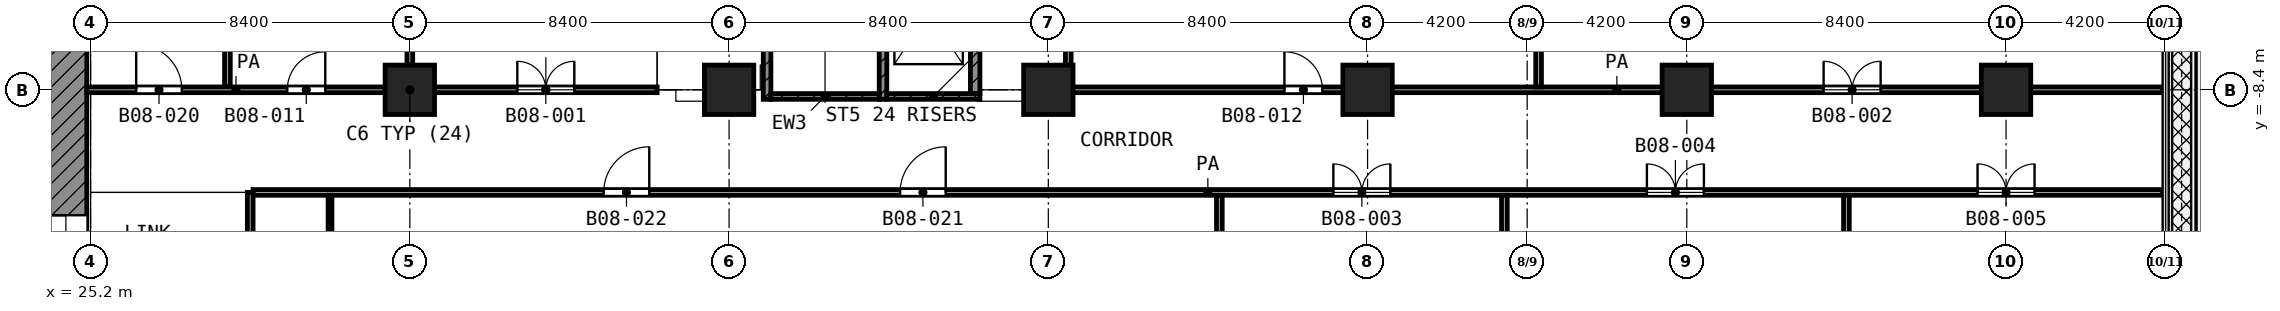
"""IFC4 building model, lengths in metres.
Left out: names, types, materials, properties, quantities, classifications, styles, units other than length and angle.
Written with IfcOpenShell. Run it as: python <this file> out.ifc"""

import sys

from ifc_helpers import new_model, si_unit, direction, frame, frame_2d, origin, origin_2d, place, context, subcontext, project, spatial, rectangle, extrude, element, fill, save


model = new_model("IFC4")
c1 = context("Model", 3, precision=1e-05, world=origin(), true_north=direction((0.0, 1.0)))
c2 = subcontext(c1, "Body", "Model", "MODEL_VIEW")
j1 = project(units=[si_unit("LENGTHUNIT", "METRE"), si_unit("PLANEANGLEUNIT", "RADIAN")], contexts=[c1])
p1 = place(None, origin())
s1 = spatial("IfcSite", under=j1, at=p1, CompositionType="ELEMENT")
p2 = place(p1, origin())
s2 = spatial("IfcBuilding", under=s1, at=p2, CompositionType="ELEMENT")
p3 = place(p2, frame((0.0, 0.0, 39.2)))
s3 = spatial("IfcBuildingStorey", under=s2, at=p3, CompositionType="ELEMENT", Elevation=39.2)
for number, where, z_axis, x_axis in (
    (1, (33.6, -8.4, 0.0), (0.0, 0.0, 1.0), (1.0, 0.0, 0.0)),
    (2, (42.0, -8.4, 0.0), (0.0, 0.0, 1.0), (1.0, 0.0, 0.0)),
    (3, (50.4, -8.4, 0.0), (0.0, 0.0, 1.0), (1.0, 0.0, 0.0)),
    (4, (58.8, -8.4, 0.0), (0.0, 0.0, 1.0), (1.0, 0.0, 0.0)),
    (5, (67.2, -8.4, 0.0), (0.0, 0.0, 1.0), (1.0, 0.0, 0.0)),
    (6, (75.6, -8.4, 0.0), (0.0, 0.0, 1.0), (1.0, 0.0, 0.0)),
):
    element("IfcColumn", number, at=place(p3, frame(where, z_axis=z_axis, x_axis=x_axis)), inside=s3, PredefinedType="COLUMN", context=c2, shape_type="SweptSolid", body=[
        extrude(rectangle(XDim=1.3, YDim=1.3, at=origin_2d()), origin(), (0.0, 0.0, 1.0), 4.2),
    ])
p4 = place(p3, frame((24.55, -24.0, 0.0), z_axis=(0.0, 0.0, 1.0), x_axis=(0.0, 1.0, 0.0)))
e7 = element("IfcWall", 7, at=p4, inside=s3, PredefinedType="SHEAR", context=c2, shape_type="SweptSolid", body=[
    extrude(rectangle(XDim=18.6, YDim=1.1, at=frame_2d((9.3, 0.0))), origin(), (0.0, 0.0, 1.0), 3.9),
])
p5 = place(p4, frame((10.5, 0.0, 0.0)))
e8 = element("IfcOpeningElement", 8, at=p5, cuts=e7, PredefinedType="OPENING", context=c2, shape_type="SweptSolid", body=[
    extrude(rectangle(XDim=1.8, YDim=2.1, at=frame_2d((0.9, 1.05))), frame((0.0, 0.56, 0.0), z_axis=(0.0, -1.0, 0.0), x_axis=(1.0, 0.0, 0.0)), (0.0, 0.0, 1.0), 1.12),
])
p6 = place(p3, frame((43.0, -8.65, 0.0), z_axis=(0.0, 0.0, 1.0), x_axis=(0.0, 1.0, 0.0)))
e9 = element("IfcWall", 9, at=p6, inside=s3, PredefinedType="SHEAR", context=c2, shape_type="SweptSolid", body=[
    extrude(rectangle(XDim=8.35, YDim=0.2, at=frame_2d((4.175, 0.0))), origin(), (0.0, 0.0, 1.0), 3.9),
])
p7 = place(p6, frame((7.0, 0.0, 0.0)))
e10 = element("IfcOpeningElement", 10, at=p7, cuts=e9, PredefinedType="OPENING", context=c2, shape_type="SweptSolid", body=[
    extrude(rectangle(XDim=1.1, YDim=2.1, at=frame_2d((0.55, 1.05))), frame((0.0, 0.11, 0.0), z_axis=(0.0, -1.0, 0.0), x_axis=(1.0, 0.0, 0.0)), (0.0, 0.0, 1.0), 0.22),
])
p8 = place(p3, frame((46.05, -8.65, 0.0), z_axis=(0.0, 0.0, 1.0), x_axis=(0.0, 1.0, 0.0)))
e11 = element("IfcWall", 11, at=p8, inside=s3, PredefinedType="SHEAR", context=c2, shape_type="SweptSolid", body=[
    extrude(rectangle(XDim=8.35, YDim=0.2, at=frame_2d((4.175, 0.0))), origin(), (0.0, 0.0, 1.0), 3.9),
])
p9 = place(p8, frame((7.0, 0.0, 0.0)))
e12 = element("IfcOpeningElement", 12, at=p9, cuts=e11, PredefinedType="OPENING", context=c2, shape_type="SweptSolid", body=[
    extrude(rectangle(XDim=1.1, YDim=2.1, at=frame_2d((0.55, 1.05))), frame((0.0, 0.11, 0.0), z_axis=(0.0, -1.0, 0.0), x_axis=(1.0, 0.0, 0.0)), (0.0, 0.0, 1.0), 0.22),
])
p10 = place(p3, frame((43.1, -8.575, 0.0), z_axis=(0.0, 0.0, 1.0), x_axis=(1.0, 0.0, 0.0)))
e13 = element("IfcWall", 13, at=p10, inside=s3, PredefinedType="SHEAR", context=c2, shape_type="SweptSolid", body=[
    extrude(rectangle(XDim=2.85, YDim=0.15, at=frame_2d((1.425, 0.0))), origin(), (0.0, 0.0, 1.0), 3.9),
])
p11 = place(p3, frame((46.15, -8.575, 0.0), z_axis=(0.0, 0.0, 1.0), x_axis=(1.0, 0.0, 0.0)))
e14 = element("IfcWall", 14, at=p11, inside=s3, PredefinedType="SHEAR", context=c2, shape_type="SweptSolid", body=[
    extrude(rectangle(XDim=2.45, YDim=0.15, at=frame_2d((1.225, 0.0))), origin(), (0.0, 0.0, 1.0), 3.9),
])
p12 = place(p3, frame((48.475, -8.5, 0.0), z_axis=(0.0, 0.0, 1.0), x_axis=(0.0, 1.0, 0.0)))
e15 = element("IfcWall", 15, at=p12, inside=s3, PredefinedType="SHEAR", context=c2, shape_type="SweptSolid", body=[
    extrude(rectangle(XDim=3.475, YDim=0.25, at=frame_2d((1.738, 0.0))), origin(), (0.0, 0.0, 1.0), 3.9),
])
p13 = place(p3, frame((31.5, -13.8, 0.0), z_axis=(0.0, 0.0, 1.0), x_axis=(0.0, 1.0, 0.0)))
e16 = element("IfcWall", 16, at=p13, inside=s3, PredefinedType="PARTITIONING", context=c2, shape_type="SweptSolid", body=[
    extrude(rectangle(XDim=2.625, YDim=0.1, at=frame_2d((1.312, 0.0))), origin(), (0.0, 0.0, 1.0), 3.9),
])
p14 = place(p3, frame((29.475, -11.1, 0.0), z_axis=(0.0, 0.0, 1.0), x_axis=(1.0, 0.0, 0.0)))
e17 = element("IfcWall", 17, at=p14, inside=s3, PredefinedType="PARTITIONING", context=c2, shape_type="SweptSolid", body=[
    extrude(rectangle(XDim=50.245, YDim=0.15, at=frame_2d((25.123, 0.0))), origin(), (0.0, 0.0, 1.0), 3.9),
])
p15 = place(p14, frame((17.025, 0.0, 0.0)))
e18 = element("IfcOpeningElement", 18, at=p15, cuts=e17, PredefinedType="OPENING", context=c2, shape_type="SweptSolid", body=[
    extrude(rectangle(XDim=1.2, YDim=2.1, at=frame_2d((0.6, 1.05))), frame((0.0, 0.085, 0.0), z_axis=(0.0, -1.0, 0.0), x_axis=(1.0, 0.0, 0.0)), (0.0, 0.0, 1.0), 0.17),
])
p16 = place(p14, frame((9.225, 0.0, 0.0)))
e19 = element("IfcOpeningElement", 19, at=p16, cuts=e17, PredefinedType="OPENING", context=c2, shape_type="SweptSolid", body=[
    extrude(rectangle(XDim=1.2, YDim=2.1, at=frame_2d((0.6, 1.05))), frame((0.0, 0.085, 0.0), z_axis=(0.0, -1.0, 0.0), x_axis=(1.0, 0.0, 0.0)), (0.0, 0.0, 1.0), 0.17),
])
p17 = place(p14, frame((28.425, 0.0, 0.0)))
e20 = element("IfcOpeningElement", 20, at=p17, cuts=e17, PredefinedType="OPENING", context=c2, shape_type="SweptSolid", body=[
    extrude(rectangle(XDim=1.5, YDim=2.1, at=frame_2d((0.75, 1.05))), frame((0.0, 0.085, 0.0), z_axis=(0.0, -1.0, 0.0), x_axis=(1.0, 0.0, 0.0)), (0.0, 0.0, 1.0), 0.17),
])
p18 = place(p14, frame((36.675, 0.0, 0.0)))
e21 = element("IfcOpeningElement", 21, at=p18, cuts=e17, PredefinedType="OPENING", context=c2, shape_type="SweptSolid", body=[
    extrude(rectangle(XDim=1.5, YDim=2.1, at=frame_2d((0.75, 1.05))), frame((0.0, 0.085, 0.0), z_axis=(0.0, -1.0, 0.0), x_axis=(1.0, 0.0, 0.0)), (0.0, 0.0, 1.0), 0.17),
])
p19 = place(p14, frame((45.375, 0.0, 0.0)))
e22 = element("IfcOpeningElement", 22, at=p19, cuts=e17, PredefinedType="OPENING", context=c2, shape_type="SweptSolid", body=[
    extrude(rectangle(XDim=1.5, YDim=2.1, at=frame_2d((0.75, 1.05))), frame((0.0, 0.085, 0.0), z_axis=(0.0, -1.0, 0.0), x_axis=(1.0, 0.0, 0.0)), (0.0, 0.0, 1.0), 0.17),
])
p20 = place(p3, frame((25.1, -8.4, 0.0), z_axis=(0.0, 0.0, 1.0), x_axis=(1.0, 0.0, 0.0)))
e23 = element("IfcWall", 23, at=p20, inside=s3, PredefinedType="PARTITIONING", context=c2, shape_type="SweptSolid", body=[
    extrude(rectangle(XDim=7.85, YDim=0.15, at=frame_2d((3.925, 0.0))), origin(), (0.0, 0.0, 1.0), 3.9),
])
p21 = place(p20, frame((1.3, 0.0, 0.0)))
e24 = element("IfcOpeningElement", 24, at=p21, cuts=e23, PredefinedType="OPENING", context=c2, shape_type="SweptSolid", body=[
    extrude(rectangle(XDim=1.2, YDim=2.1, at=frame_2d((0.6, 1.05))), frame((0.0, 0.085, 0.0), z_axis=(0.0, -1.0, 0.0), x_axis=(1.0, 0.0, 0.0)), (0.0, 0.0, 1.0), 0.17),
])
p22 = place(p20, frame((5.275, 0.0, 0.0)))
e25 = element("IfcOpeningElement", 25, at=p22, cuts=e23, PredefinedType="OPENING", context=c2, shape_type="SweptSolid", body=[
    extrude(rectangle(XDim=1.0, YDim=2.1, at=frame_2d((0.5, 1.05))), frame((0.0, 0.085, 0.0), z_axis=(0.0, -1.0, 0.0), x_axis=(1.0, 0.0, 0.0)), (0.0, 0.0, 1.0), 0.17),
])
p23 = place(p3, frame((34.25, -8.4, 0.0), z_axis=(0.0, 0.0, 1.0), x_axis=(1.0, 0.0, 0.0)))
e26 = element("IfcWall", 26, at=p23, inside=s3, PredefinedType="PARTITIONING", context=c2, shape_type="SweptSolid", body=[
    extrude(rectangle(XDim=5.857, YDim=0.15, at=frame_2d((2.928, 0.0))), origin(), (0.0, 0.0, 1.0), 3.9),
])
p24 = place(p23, frame((2.178, 0.0, 0.0)))
e27 = element("IfcOpeningElement", 27, at=p24, cuts=e26, PredefinedType="OPENING", context=c2, shape_type="SweptSolid", body=[
    extrude(rectangle(XDim=1.5, YDim=2.1, at=frame_2d((0.75, 1.05))), frame((0.0, 0.085, 0.0), z_axis=(0.0, -1.0, 0.0), x_axis=(1.0, 0.0, 0.0)), (0.0, 0.0, 1.0), 0.17),
])
p25 = place(p3, frame((51.0, -8.4, 0.0), z_axis=(0.0, 0.0, 1.0), x_axis=(1.0, 0.0, 0.0)))
e28 = element("IfcWall", 28, at=p25, inside=s3, PredefinedType="PARTITIONING", context=c2, shape_type="SweptSolid", body=[
    extrude(rectangle(XDim=28.72, YDim=0.15, at=frame_2d((14.36, 0.0))), origin(), (0.0, 0.0, 1.0), 3.9),
])
p26 = place(p25, frame((5.612, 0.0, 0.0)))
e29 = element("IfcOpeningElement", 29, at=p26, cuts=e28, PredefinedType="OPENING", context=c2, shape_type="SweptSolid", body=[
    extrude(rectangle(XDim=1.0, YDim=2.1, at=frame_2d((0.5, 1.05))), frame((0.0, 0.085, 0.0), z_axis=(0.0, -1.0, 0.0), x_axis=(1.0, 0.0, 0.0)), (0.0, 0.0, 1.0), 0.17),
])
p27 = place(p25, frame((19.8, 0.0, 0.0)))
e30 = element("IfcOpeningElement", 30, at=p27, cuts=e28, PredefinedType="OPENING", context=c2, shape_type="SweptSolid", body=[
    extrude(rectangle(XDim=1.5, YDim=2.1, at=frame_2d((0.75, 1.05))), frame((0.0, 0.085, 0.0), z_axis=(0.0, -1.0, 0.0), x_axis=(1.0, 0.0, 0.0)), (0.0, 0.0, 1.0), 0.17),
])
p28 = place(p3, frame((28.8, -8.325, 0.0), z_axis=(0.0, 0.0, 1.0), x_axis=(0.0, 1.0, 0.0)))
e31 = element("IfcWall", 31, at=p28, inside=s3, PredefinedType="PARTITIONING", context=c2, shape_type="SweptSolid", body=[
    extrude(rectangle(XDim=8.245, YDim=0.15, at=frame_2d((4.123, 0.0))), origin(), (0.0, 0.0, 1.0), 3.9),
])
p29 = place(p3, frame((29.4, -14.1, 0.0), z_axis=(0.0, 0.0, 1.0), x_axis=(0.0, 1.0, 0.0)))
e32 = element("IfcWall", 32, at=p29, inside=s3, PredefinedType="PARTITIONING", context=c2, shape_type="SweptSolid", body=[
    extrude(rectangle(XDim=3.0, YDim=0.15, at=frame_2d((1.5, 0.0))), origin(), (0.0, 0.0, 1.0), 3.9),
])
p30 = place(p3, frame((33.6, -7.75, 0.0), z_axis=(0.0, 0.0, 1.0), x_axis=(0.0, 1.0, 0.0)))
e33 = element("IfcWall", 33, at=p30, inside=s3, PredefinedType="PARTITIONING", context=c2, shape_type="SweptSolid", body=[
    extrude(rectangle(XDim=7.15, YDim=0.15, at=frame_2d((3.575, 0.0))), origin(), (0.0, 0.0, 1.0), 3.9),
])
p31 = place(p3, frame((50.925, -8.4, 0.0), z_axis=(0.0, 0.0, 1.0), x_axis=(0.0, 1.0, 0.0)))
e34 = element("IfcWall", 34, at=p31, inside=s3, PredefinedType="PARTITIONING", context=c2, shape_type="SweptSolid", body=[
    extrude(rectangle(XDim=6.55, YDim=0.15, at=frame_2d((3.275, 0.0))), origin(), (0.0, 0.0, 1.0), 3.9),
])
for number, where, z_axis, x_axis in (
    (35, (54.9, -25.12, 0.0), (0.0, 0.0, 1.0), (0.0, 1.0, 0.0)),
    (36, (62.4, -25.12, 0.0), (0.0, 0.0, 1.0), (0.0, 1.0, 0.0)),
):
    element("IfcWall", number, at=place(p3, frame(where, z_axis=z_axis, x_axis=x_axis)), inside=s3, PredefinedType="PARTITIONING", context=c2, shape_type="SweptSolid", body=[
        extrude(rectangle(XDim=13.945, YDim=0.15, at=frame_2d((6.973, 0.0))), origin(), (0.0, 0.0, 1.0), 3.9),
    ])
p32 = place(p3, frame((63.3, -8.325, 0.0), z_axis=(0.0, 0.0, 1.0), x_axis=(0.0, 1.0, 0.0)))
e37 = element("IfcWall", 37, at=p32, inside=s3, PredefinedType="PARTITIONING", context=c2, shape_type="SweptSolid", body=[
    extrude(rectangle(XDim=8.245, YDim=0.15, at=frame_2d((4.123, 0.0))), origin(), (0.0, 0.0, 1.0), 3.9),
])
p33 = place(p3, frame((71.4, -25.12, 0.0), z_axis=(0.0, 0.0, 1.0), x_axis=(0.0, 1.0, 0.0)))
e38 = element("IfcWall", 38, at=p33, inside=s3, PredefinedType="PARTITIONING", context=c2, shape_type="SweptSolid", body=[
    extrude(rectangle(XDim=13.945, YDim=0.15, at=frame_2d((6.973, 0.0))), origin(), (0.0, 0.0, 1.0), 3.9),
])
p34 = place(p5, origin())
e39 = element("IfcDoor", 39, at=p34, inside=s3, OperationType="DOUBLE_DOOR_SINGLE_SWING", PredefinedType="DOOR", context=c2, shape_type="SweptSolid", body=[
    extrude(rectangle(XDim=1.8, YDim=2.1, at=frame_2d((0.9, 1.05))), frame((0.0, 0.025, 0.0), z_axis=(0.0, -1.0, 0.0), x_axis=(1.0, 0.0, 0.0)), (0.0, 0.0, 1.0), 0.05),
])
fill(e8, e39)
p35 = place(p21, origin())
e40 = element("IfcDoor", 40, at=p35, inside=s3, OperationType="SINGLE_SWING_LEFT", PredefinedType="DOOR", context=c2, shape_type="SweptSolid", body=[
    extrude(rectangle(XDim=1.2, YDim=2.1, at=frame_2d((0.6, 1.05))), frame((0.0, 0.025, 0.0), z_axis=(0.0, -1.0, 0.0), x_axis=(1.0, 0.0, 0.0)), (0.0, 0.0, 1.0), 0.05),
])
fill(e24, e40)
p36 = place(p22, origin())
e41 = element("IfcDoor", 41, at=p36, inside=s3, OperationType="SINGLE_SWING_RIGHT", PredefinedType="DOOR", context=c2, shape_type="SweptSolid", body=[
    extrude(rectangle(XDim=1.0, YDim=2.1, at=frame_2d((0.5, 1.05))), frame((0.0, 0.025, 0.0), z_axis=(0.0, -1.0, 0.0), x_axis=(1.0, 0.0, 0.0)), (0.0, 0.0, 1.0), 0.05),
])
fill(e25, e41)
p37 = place(p24, origin())
e42 = element("IfcDoor", 42, at=p37, inside=s3, OperationType="DOUBLE_DOOR_SINGLE_SWING", PredefinedType="DOOR", context=c2, shape_type="SweptSolid", body=[
    extrude(rectangle(XDim=1.5, YDim=2.1, at=frame_2d((0.75, 1.05))), frame((0.0, 0.025, 0.0), z_axis=(0.0, -1.0, 0.0), x_axis=(1.0, 0.0, 0.0)), (0.0, 0.0, 1.0), 0.05),
])
fill(e27, e42)
p38 = place(p26, origin())
e43 = element("IfcDoor", 43, at=p38, inside=s3, OperationType="SINGLE_SWING_LEFT", PredefinedType="DOOR", context=c2, shape_type="SweptSolid", body=[
    extrude(rectangle(XDim=1.0, YDim=2.1, at=frame_2d((0.5, 1.05))), frame((0.0, 0.025, 0.0), z_axis=(0.0, -1.0, 0.0), x_axis=(1.0, 0.0, 0.0)), (0.0, 0.0, 1.0), 0.05),
])
fill(e29, e43)
p39 = place(p27, origin())
e44 = element("IfcDoor", 44, at=p39, inside=s3, OperationType="DOUBLE_DOOR_SINGLE_SWING", PredefinedType="DOOR", context=c2, shape_type="SweptSolid", body=[
    extrude(rectangle(XDim=1.5, YDim=2.1, at=frame_2d((0.75, 1.05))), frame((0.0, 0.025, 0.0), z_axis=(0.0, -1.0, 0.0), x_axis=(1.0, 0.0, 0.0)), (0.0, 0.0, 1.0), 0.05),
])
fill(e30, e44)
p40 = place(p15, origin())
e45 = element("IfcDoor", 45, at=p40, inside=s3, OperationType="SINGLE_SWING_RIGHT", PredefinedType="DOOR", context=c2, shape_type="SweptSolid", body=[
    extrude(rectangle(XDim=1.2, YDim=2.1, at=frame_2d((0.6, 1.05))), frame((0.0, 0.025, 0.0), z_axis=(0.0, -1.0, 0.0), x_axis=(1.0, 0.0, 0.0)), (0.0, 0.0, 1.0), 0.05),
])
fill(e18, e45)
p41 = place(p16, origin())
e46 = element("IfcDoor", 46, at=p41, inside=s3, OperationType="SINGLE_SWING_RIGHT", PredefinedType="DOOR", context=c2, shape_type="SweptSolid", body=[
    extrude(rectangle(XDim=1.2, YDim=2.1, at=frame_2d((0.6, 1.05))), frame((0.0, 0.025, 0.0), z_axis=(0.0, -1.0, 0.0), x_axis=(1.0, 0.0, 0.0)), (0.0, 0.0, 1.0), 0.05),
])
fill(e19, e46)
p42 = place(p17, origin())
e47 = element("IfcDoor", 47, at=p42, inside=s3, OperationType="DOUBLE_DOOR_SINGLE_SWING", PredefinedType="DOOR", context=c2, shape_type="SweptSolid", body=[
    extrude(rectangle(XDim=1.5, YDim=2.1, at=frame_2d((0.75, 1.05))), frame((0.0, 0.025, 0.0), z_axis=(0.0, -1.0, 0.0), x_axis=(1.0, 0.0, 0.0)), (0.0, 0.0, 1.0), 0.05),
])
fill(e20, e47)
p43 = place(p18, origin())
e48 = element("IfcDoor", 48, at=p43, inside=s3, OperationType="DOUBLE_DOOR_SINGLE_SWING", PredefinedType="DOOR", context=c2, shape_type="SweptSolid", body=[
    extrude(rectangle(XDim=1.5, YDim=2.1, at=frame_2d((0.75, 1.05))), frame((0.0, 0.025, 0.0), z_axis=(0.0, -1.0, 0.0), x_axis=(1.0, 0.0, 0.0)), (0.0, 0.0, 1.0), 0.05),
])
fill(e21, e48)
p44 = place(p19, origin())
e49 = element("IfcDoor", 49, at=p44, inside=s3, OperationType="DOUBLE_DOOR_SINGLE_SWING", PredefinedType="DOOR", context=c2, shape_type="SweptSolid", body=[
    extrude(rectangle(XDim=1.5, YDim=2.1, at=frame_2d((0.75, 1.05))), frame((0.0, 0.025, 0.0), z_axis=(0.0, -1.0, 0.0), x_axis=(1.0, 0.0, 0.0)), (0.0, 0.0, 1.0), 0.05),
])
fill(e22, e49)
save(model, sys.argv[1])
